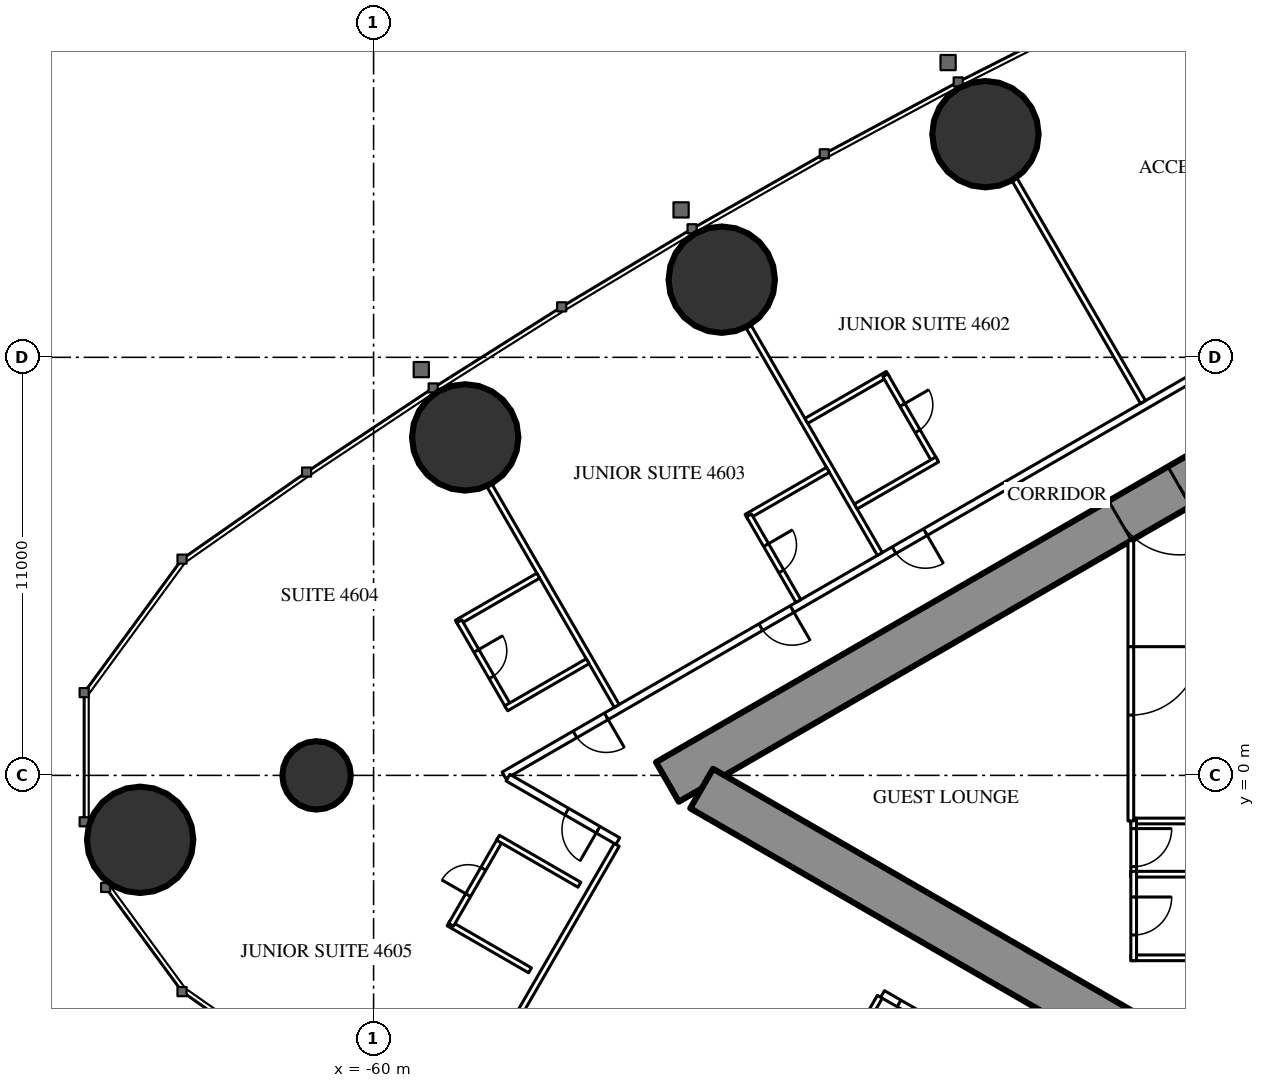
"""IFC4 building model, lengths in metres.
Left out: names, types, materials, properties, quantities, classifications, styles, units other than length and angle.
Written with IfcOpenShell. Run it as: python <this file> out.ifc"""

import sys

from ifc_helpers import new_model, si_unit, direction, frame, frame_2d, origin, origin_2d, place, context, subcontext, project, spatial, rectangle, circle, extrude, element, fill, save


model = new_model("IFC4")
c1 = context("Model", 3, precision=1e-05, world=origin(), true_north=direction((0.0, 1.0)))
c2 = subcontext(c1, "Body", "Model", "MODEL_VIEW")
j1 = project(units=[si_unit("LENGTHUNIT", "METRE"), si_unit("PLANEANGLEUNIT", "RADIAN")], contexts=[c1])
p1 = place(None, origin())
s1 = spatial("IfcSite", under=j1, at=p1, CompositionType="ELEMENT")
p2 = place(p1, origin())
s2 = spatial("IfcBuilding", under=s1, at=p2, CompositionType="ELEMENT")
p3 = place(p2, frame((0.0, 0.0, 173.8)))
s3 = spatial("IfcBuildingStorey", under=s2, at=p3, CompositionType="ELEMENT", Elevation=173.8)
for number, where, z_axis, x_axis in (
    (1, (-66.143, -1.695, 0.0), (0.0, 0.0, 1.0), (1.0, 0.0, 0.0)),
    (2, (-43.9, 16.871, 0.0), (0.0, 0.0, 1.0), (1.0, 0.0, 0.0)),
    (3, (-50.839, 13.043, 0.0), (0.0, 0.0, 1.0), (1.0, 0.0, 0.0)),
    (4, (-57.59, 8.893, 0.0), (0.0, 0.0, 1.0), (1.0, 0.0, 0.0)),
):
    element("IfcColumn", number, at=place(p3, frame(where, z_axis=z_axis, x_axis=x_axis)), inside=s3, PredefinedType="COLUMN", context=c2, shape_type="SweptSolid", body=[
        extrude(circle(Radius=1.4, at=origin_2d()), origin(), (0.0, 0.0, 1.0), 3.5),
    ])
p4 = place(p3, frame((-61.5, 0.0, 0.0), z_axis=(0.0, 0.0, 1.0), x_axis=(1.0, 0.0, 0.0)))
e5 = element("IfcColumn", 5, at=p4, inside=s3, PredefinedType="COLUMN", context=c2, shape_type="SweptSolid", body=[
    extrude(circle(Radius=0.9, at=origin_2d()), origin(), (0.0, 0.0, 1.0), 3.5),
])
p5 = place(p3, frame((-27.2, 14.3, 0.0), z_axis=(0.0, 0.0, 1.0), x_axis=(-0.866026593062, -0.499997940104, 0.0)))
e6 = element("IfcWall", 6, at=p5, inside=s3, PredefinedType="SHEAR", context=c2, shape_type="SweptSolid", body=[
    extrude(rectangle(XDim=28.946, YDim=1.2, at=frame_2d((14.473, 0.0))), origin(), (0.0, 0.0, 1.0), 3.5),
])
p6 = place(p5, frame((4.6, 0.0, 0.0)))
e7 = element("IfcOpeningElement", 7, at=p6, cuts=e6, PredefinedType="OPENING", context=c2, shape_type="SweptSolid", body=[
    extrude(rectangle(XDim=1.0, YDim=2.2, at=frame_2d((0.5, 1.1))), frame((0.0, 0.61, 0.0), z_axis=(0.0, -1.0, 0.0), x_axis=(1.0, 0.0, 0.0)), (0.0, 0.0, 1.0), 1.22),
])
p7 = place(p5, frame((13.395, 0.0, 0.0)))
e8 = element("IfcOpeningElement", 8, at=p7, cuts=e6, PredefinedType="OPENING", context=c2, shape_type="SweptSolid", body=[
    extrude(rectangle(XDim=1.8, YDim=2.2, at=frame_2d((0.9, 1.1))), frame((0.0, 0.61, 0.0), z_axis=(0.0, -1.0, 0.0), x_axis=(1.0, 0.0, 0.0)), (0.0, 0.0, 1.0), 1.22),
])
p8 = place(p3, frame((-27.2, -14.3, 0.0), z_axis=(0.0, 0.0, 1.0), x_axis=(-0.866024021859, 0.500002393557, 0.0)))
e9 = element("IfcWall", 9, at=p8, inside=s3, PredefinedType="SHEAR", context=c2, shape_type="SweptSolid", body=[
    extrude(rectangle(XDim=27.907, YDim=1.2, at=frame_2d((13.954, 0.0))), origin(), (0.0, 0.0, 1.0), 3.5),
])
p9 = place(p8, frame((4.6, 0.0, 0.0)))
e10 = element("IfcOpeningElement", 10, at=p9, cuts=e9, PredefinedType="OPENING", context=c2, shape_type="SweptSolid", body=[
    extrude(rectangle(XDim=1.0, YDim=2.2, at=frame_2d((0.5, 1.1))), frame((0.0, 0.61, 0.0), z_axis=(0.0, -1.0, 0.0), x_axis=(1.0, 0.0, 0.0)), (0.0, 0.0, 1.0), 1.22),
])
p10 = place(p8, frame((13.395, 0.0, 0.0)))
e11 = element("IfcOpeningElement", 11, at=p10, cuts=e9, PredefinedType="OPENING", context=c2, shape_type="SweptSolid", body=[
    extrude(rectangle(XDim=1.8, YDim=2.2, at=frame_2d((0.9, 1.1))), frame((0.0, 0.61, 0.0), z_axis=(0.0, -1.0, 0.0), x_axis=(1.0, 0.0, 0.0)), (0.0, 0.0, 1.0), 1.22),
])
p11 = place(p3, frame((-27.86, 16.575, 0.0), z_axis=(0.0, 0.0, 1.0), x_axis=(-0.866025533911, -0.499999774615, 0.0)))
e12 = element("IfcWall", 12, at=p11, inside=s3, PredefinedType="PARTITIONING", context=c2, shape_type="SweptSolid", body=[
    extrude(rectangle(XDim=33.149, YDim=0.2, at=frame_2d((16.575, 0.0))), origin(), (0.0, 0.0, 1.0), 3.25),
])
p12 = place(p11, frame((3.75, 0.0, 0.0)))
e13 = element("IfcOpeningElement", 13, at=p12, cuts=e12, PredefinedType="OPENING", context=c2, shape_type="SweptSolid", body=[
    extrude(rectangle(XDim=1.0, YDim=2.2, at=frame_2d((0.5, 1.1))), frame((0.0, 0.11, 0.0), z_axis=(0.0, -1.0, 0.0), x_axis=(1.0, 0.0, 0.0)), (0.0, 0.0, 1.0), 0.22),
])
p13 = place(p11, frame((20.347, 0.0, 0.0)))
e14 = element("IfcOpeningElement", 14, at=p13, cuts=e12, PredefinedType="OPENING", context=c2, shape_type="SweptSolid", body=[
    extrude(rectangle(XDim=0.95, YDim=2.2, at=frame_2d((0.475, 1.1))), frame((0.0, 0.11, 0.0), z_axis=(0.0, -1.0, 0.0), x_axis=(1.0, 0.0, 0.0)), (0.0, 0.0, 1.0), 0.22),
])
p14 = place(p11, frame((24.397, 0.0, 0.0)))
e15 = element("IfcOpeningElement", 15, at=p14, cuts=e12, PredefinedType="OPENING", context=c2, shape_type="SweptSolid", body=[
    extrude(rectangle(XDim=0.95, YDim=2.2, at=frame_2d((0.475, 1.1))), frame((0.0, 0.11, 0.0), z_axis=(0.0, -1.0, 0.0), x_axis=(1.0, 0.0, 0.0)), (0.0, 0.0, 1.0), 0.22),
])
p15 = place(p11, frame((30.042, 0.0, 0.0)))
e16 = element("IfcOpeningElement", 16, at=p15, cuts=e12, PredefinedType="OPENING", context=c2, shape_type="SweptSolid", body=[
    extrude(rectangle(XDim=0.95, YDim=2.2, at=frame_2d((0.475, 1.1))), frame((0.0, 0.11, 0.0), z_axis=(0.0, -1.0, 0.0), x_axis=(1.0, 0.0, 0.0)), (0.0, 0.0, 1.0), 0.22),
])
p16 = place(p3, frame((-39.754, 9.823, 0.0), z_axis=(0.0, 0.0, 1.0), x_axis=(-0.499997670926, 0.866026748472, 0.0)))
e17 = element("IfcWall", 17, at=p16, inside=s3, PredefinedType="PARTITIONING", context=c2, shape_type="SweptSolid", body=[
    extrude(rectangle(XDim=6.757, YDim=0.15, at=frame_2d((3.379, 0.0))), origin(), (0.0, 0.0, 1.0), 2.3),
])
p17 = place(p3, frame((-46.679, 5.825, 0.0), z_axis=(0.0, 0.0, 1.0), x_axis=(-0.500006839597, 0.866021454905, 0.0)))
e18 = element("IfcWall", 18, at=p17, inside=s3, PredefinedType="PARTITIONING", context=c2, shape_type="SweptSolid", body=[
    extrude(rectangle(XDim=6.911, YDim=0.15, at=frame_2d((3.456, 0.0))), origin(), (0.0, 0.0, 1.0), 2.3),
])
p18 = place(p3, frame((-53.602, 1.828, 0.0), z_axis=(0.0, 0.0, 1.0), x_axis=(-0.49999191814, 0.866030069798, 0.0)))
e19 = element("IfcWall", 19, at=p18, inside=s3, PredefinedType="PARTITIONING", context=c2, shape_type="SweptSolid", body=[
    extrude(rectangle(XDim=6.692, YDim=0.15, at=frame_2d((3.346, 0.0))), origin(), (0.0, 0.0, 1.0), 2.3),
])
p19 = place(p3, frame((-46.679, -5.825, 0.0), z_axis=(0.0, 0.0, 1.0), x_axis=(-0.500006839597, -0.866021454905, 0.0)))
e20 = element("IfcWall", 20, at=p19, inside=s3, PredefinedType="PARTITIONING", context=c2, shape_type="SweptSolid", body=[
    extrude(rectangle(XDim=6.911, YDim=0.15, at=frame_2d((3.456, 0.0))), origin(), (0.0, 0.0, 1.0), 2.3),
])
p20 = place(p3, frame((-53.602, -1.828, 0.0), z_axis=(0.0, 0.0, 1.0), x_axis=(-0.49999191814, -0.866030069798, 0.0)))
e21 = element("IfcWall", 21, at=p20, inside=s3, PredefinedType="PARTITIONING", context=c2, shape_type="SweptSolid", body=[
    extrude(rectangle(XDim=6.692, YDim=0.15, at=frame_2d((3.346, 0.0))), origin(), (0.0, 0.0, 1.0), 2.3),
])
p21 = place(p3, frame((-44.715, -6.844, 0.0), z_axis=(0.0, 0.0, 1.0), x_axis=(-0.865999496279, 0.500044870432, 0.0)))
e22 = element("IfcWall", 22, at=p21, inside=s3, PredefinedType="PARTITIONING", context=c2, shape_type="SweptSolid", body=[
    extrude(rectangle(XDim=2.185, YDim=0.2, at=frame_2d((1.092, 0.0))), origin(), (0.0, 0.0, 1.0), 3.25),
])
p22 = place(p21, frame((0.5, 0.0, 0.0)))
e23 = element("IfcOpeningElement", 23, at=p22, cuts=e22, PredefinedType="OPENING", context=c2, shape_type="SweptSolid", body=[
    extrude(rectangle(XDim=1.185, YDim=2.2, at=frame_2d((0.593, 1.1))), frame((0.0, 0.11, 0.0), z_axis=(0.0, -1.0, 0.0), x_axis=(1.0, 0.0, 0.0)), (0.0, 0.0, 1.0), 0.22),
])
p23 = place(p3, frame((-53.574, -1.729, 0.0), z_axis=(0.0, 0.0, 1.0), x_axis=(-0.866019930389, 0.500009480079, 0.0)))
e24 = element("IfcWall", 24, at=p23, inside=s3, PredefinedType="PARTITIONING", context=c2, shape_type="SweptSolid", body=[
    extrude(rectangle(XDim=3.338, YDim=0.2, at=frame_2d((1.669, 0.0))), origin(), (0.0, 0.0, 1.0), 3.25),
])
p24 = place(p23, frame((0.6, 0.0, 0.0)))
e25 = element("IfcOpeningElement", 25, at=p24, cuts=e24, PredefinedType="OPENING", context=c2, shape_type="SweptSolid", body=[
    extrude(rectangle(XDim=0.95, YDim=2.2, at=frame_2d((0.475, 1.1))), frame((0.0, 0.11, 0.0), z_axis=(0.0, -1.0, 0.0), x_axis=(1.0, 0.0, 0.0)), (0.0, 0.0, 1.0), 0.22),
])
p25 = place(p3, frame((-46.47, 10.564, 0.0), z_axis=(0.0, 0.0, 1.0), x_axis=(-0.866006523861, -0.500032699561, 0.0)))
e26 = element("IfcWall", 26, at=p25, inside=s3, PredefinedType="PARTITIONING", context=c2, shape_type="SweptSolid", body=[
    extrude(rectangle(XDim=2.475, YDim=0.15, at=frame_2d((1.237, 0.0))), origin(), (0.0, 0.0, 1.0), 3.25),
])
p26 = place(p3, frame((-45.235, 8.275, 0.0), z_axis=(0.0, 0.0, 1.0), x_axis=(-0.500006934395, 0.866021400173, 0.0)))
e27 = element("IfcWall", 27, at=p26, inside=s3, PredefinedType="PARTITIONING", context=c2, shape_type="SweptSolid", body=[
    extrude(rectangle(XDim=2.6, YDim=0.15, at=frame_2d((1.3, 0.0))), origin(), (0.0, 0.0, 1.0), 3.25),
])
p27 = place(p26, frame((0.9, 0.0, 0.0)))
e28 = element("IfcOpeningElement", 28, at=p27, cuts=e27, PredefinedType="OPENING", context=c2, shape_type="SweptSolid", body=[
    extrude(rectangle(XDim=0.8, YDim=2.2, at=frame_2d((0.4, 1.1))), frame((0.0, 0.085, 0.0), z_axis=(0.0, -1.0, 0.0), x_axis=(1.0, 0.0, 0.0)), (0.0, 0.0, 1.0), 0.17),
])
for number, where, z_axis, x_axis in (
    (29, (-45.17, 8.312, 0.0), (0.0, 0.0, 1.0), (-0.866, -0.5, 0.0)),
    (30, (-48.044, 8.039, 0.0), (0.0, 0.0, 1.0), (-0.866, -0.5, 0.0)),
):
    element("IfcWall", number, at=place(p3, frame(where, z_axis=z_axis, x_axis=x_axis)), inside=s3, PredefinedType="PARTITIONING", context=c2, shape_type="SweptSolid", body=[
        extrude(rectangle(XDim=2.475, YDim=0.15, at=frame_2d((1.238, 0.0))), origin(), (0.0, 0.0, 1.0), 3.25),
    ])
p28 = place(p3, frame((-48.822, 4.588, 0.0), z_axis=(0.0, 0.0, 1.0), x_axis=(-0.500006934395, 0.866021400173, 0.0)))
e31 = element("IfcWall", 31, at=p28, inside=s3, PredefinedType="PARTITIONING", context=c2, shape_type="SweptSolid", body=[
    extrude(rectangle(XDim=2.6, YDim=0.15, at=frame_2d((1.3, 0.0))), origin(), (0.0, 0.0, 1.0), 3.25),
])
p29 = place(p28, frame((0.9, 0.0, 0.0)))
e32 = element("IfcOpeningElement", 32, at=p29, cuts=e31, PredefinedType="OPENING", context=c2, shape_type="SweptSolid", body=[
    extrude(rectangle(XDim=0.8, YDim=2.2, at=frame_2d((0.4, 1.1))), frame((0.0, 0.085, 0.0), z_axis=(0.0, -1.0, 0.0), x_axis=(1.0, 0.0, 0.0)), (0.0, 0.0, 1.0), 0.17),
])
p30 = place(p3, frame((-55.667, 5.255, 0.0), z_axis=(0.0, 0.0, 1.0), x_axis=(-0.866006523861, -0.500032699561, 0.0)))
e33 = element("IfcWall", 33, at=p30, inside=s3, PredefinedType="PARTITIONING", context=c2, shape_type="SweptSolid", body=[
    extrude(rectangle(XDim=2.475, YDim=0.15, at=frame_2d((1.237, 0.0))), origin(), (0.0, 0.0, 1.0), 3.25),
])
p31 = place(p3, frame((-56.446, 1.803, 0.0), z_axis=(0.0, 0.0, 1.0), x_axis=(-0.499936506574, 0.866062058628, 0.0)))
e34 = element("IfcWall", 34, at=p31, inside=s3, PredefinedType="PARTITIONING", context=c2, shape_type="SweptSolid", body=[
    extrude(rectangle(XDim=2.6, YDim=0.15, at=frame_2d((1.3, 0.0))), origin(), (0.0, 0.0, 1.0), 3.25),
])
p32 = place(p31, frame((0.9, 0.0, 0.0)))
e35 = element("IfcOpeningElement", 35, at=p32, cuts=e34, PredefinedType="OPENING", context=c2, shape_type="SweptSolid", body=[
    extrude(rectangle(XDim=0.8, YDim=2.2, at=frame_2d((0.4, 1.1))), frame((0.0, 0.085, 0.0), z_axis=(0.0, -1.0, 0.0), x_axis=(1.0, 0.0, 0.0)), (0.0, 0.0, 1.0), 0.17),
])
p33 = place(p3, frame((-54.367, 3.003, 0.0), z_axis=(0.0, 0.0, 1.0), x_axis=(-0.866031185235, -0.4999899861, 0.0)))
e36 = element("IfcWall", 36, at=p33, inside=s3, PredefinedType="PARTITIONING", context=c2, shape_type="SweptSolid", body=[
    extrude(rectangle(XDim=2.475, YDim=0.15, at=frame_2d((1.238, 0.0))), origin(), (0.0, 0.0, 1.0), 3.25),
])
p34 = place(p3, frame((-55.884, -5.13, 0.0), z_axis=(0.0, 0.0, 1.0), x_axis=(-0.866006523861, 0.500032699561, 0.0)))
e37 = element("IfcWall", 37, at=p34, inside=s3, PredefinedType="PARTITIONING", context=c2, shape_type="SweptSolid", body=[
    extrude(rectangle(XDim=2.475, YDim=0.15, at=frame_2d((1.237, 0.0))), origin(), (0.0, 0.0, 1.0), 3.25),
])
p35 = place(p3, frame((-56.662, -1.678, 0.0), z_axis=(0.0, 0.0, 1.0), x_axis=(-0.500006934395, -0.866021400173, 0.0)))
e38 = element("IfcWall", 38, at=p35, inside=s3, PredefinedType="PARTITIONING", context=c2, shape_type="SweptSolid", body=[
    extrude(rectangle(XDim=2.6, YDim=0.15, at=frame_2d((1.3, 0.0))), origin(), (0.0, 0.0, 1.0), 3.25),
])
p36 = place(p35, frame((0.9, 0.0, 0.0)))
e39 = element("IfcOpeningElement", 39, at=p36, cuts=e38, PredefinedType="OPENING", context=c2, shape_type="SweptSolid", body=[
    extrude(rectangle(XDim=0.8, YDim=2.2, at=frame_2d((0.4, 1.1))), frame((0.0, 0.085, 0.0), z_axis=(0.0, -1.0, 0.0), x_axis=(1.0, 0.0, 0.0)), (0.0, 0.0, 1.0), 0.17),
])
p37 = place(p3, frame((-54.583, -2.878, 0.0), z_axis=(0.0, 0.0, 1.0), x_axis=(-0.866006523861, 0.500032699561, 0.0)))
e40 = element("IfcWall", 40, at=p37, inside=s3, PredefinedType="PARTITIONING", context=c2, shape_type="SweptSolid", body=[
    extrude(rectangle(XDim=2.475, YDim=0.15, at=frame_2d((1.237, 0.0))), origin(), (0.0, 0.0, 1.0), 3.25),
])
for number, where, z_axis, x_axis in (
    (41, (-37.9, -1.2, 0.0), (0.0, 0.0, 1.0), (-1.0, 0.0, 0.0)),
    (42, (-37.9, -2.6, 0.0), (0.0, 0.0, 1.0), (-1.0, 0.0, 0.0)),
    (43, (-37.9, -4.8, 0.0), (0.0, 0.0, 1.0), (-1.0, 0.0, 0.0)),
):
    element("IfcWall", number, at=place(p3, frame(where, z_axis=z_axis, x_axis=x_axis)), inside=s3, PredefinedType="PARTITIONING", context=c2, shape_type="SweptSolid", body=[
        extrude(rectangle(XDim=2.175, YDim=0.15, at=frame_2d((1.087, 0.0))), origin(), (0.0, 0.0, 1.0), 3.25),
    ])
p38 = place(p3, frame((-40.0, -1.125, 0.0), z_axis=(0.0, 0.0, 1.0), x_axis=(0.0, -1.0, 0.0)))
e44 = element("IfcWall", 44, at=p38, inside=s3, PredefinedType="PARTITIONING", context=c2, shape_type="SweptSolid", body=[
    extrude(rectangle(XDim=1.55, YDim=0.15, at=frame_2d((0.775, 0.0))), origin(), (0.0, 0.0, 1.0), 3.25),
])
p39 = place(p38, frame((0.275, 0.0, 0.0)))
e45 = element("IfcOpeningElement", 45, at=p39, cuts=e44, PredefinedType="OPENING", context=c2, shape_type="SweptSolid", body=[
    extrude(rectangle(XDim=1.0, YDim=2.2, at=frame_2d((0.5, 1.1))), frame((0.0, 0.085, 0.0), z_axis=(0.0, -1.0, 0.0), x_axis=(1.0, 0.0, 0.0)), (0.0, 0.0, 1.0), 0.17),
])
p40 = place(p3, frame((-40.0, -2.525, 0.0), z_axis=(0.0, 0.0, 1.0), x_axis=(0.0, -1.0, 0.0)))
e46 = element("IfcWall", 46, at=p40, inside=s3, PredefinedType="PARTITIONING", context=c2, shape_type="SweptSolid", body=[
    extrude(rectangle(XDim=2.35, YDim=0.15, at=frame_2d((1.175, 0.0))), origin(), (0.0, 0.0, 1.0), 3.25),
])
p41 = place(p40, frame((0.675, 0.0, 0.0)))
e47 = element("IfcOpeningElement", 47, at=p41, cuts=e46, PredefinedType="OPENING", context=c2, shape_type="SweptSolid", body=[
    extrude(rectangle(XDim=1.0, YDim=2.2, at=frame_2d((0.5, 1.1))), frame((0.0, 0.085, 0.0), z_axis=(0.0, -1.0, 0.0), x_axis=(1.0, 0.0, 0.0)), (0.0, 0.0, 1.0), 0.17),
])
p42 = place(p3, frame((-40.075, 6.174, 0.0), z_axis=(0.0, 0.0, 1.0), x_axis=(0.0, -1.0, 0.0)))
e48 = element("IfcWall", 48, at=p42, inside=s3, PredefinedType="PARTITIONING", context=c2, shape_type="SweptSolid", body=[
    extrude(rectangle(XDim=7.374, YDim=0.15, at=frame_2d((3.687, 0.0))), origin(), (0.0, 0.0, 1.0), 3.25),
])
p43 = place(p42, frame((2.787, 0.0, 0.0)))
e49 = element("IfcOpeningElement", 49, at=p43, cuts=e48, PredefinedType="OPENING", context=c2, shape_type="SweptSolid", body=[
    extrude(rectangle(XDim=1.8, YDim=2.2, at=frame_2d((0.9, 1.1))), frame((0.0, 0.085, 0.0), z_axis=(0.0, -1.0, 0.0), x_axis=(1.0, 0.0, 0.0)), (0.0, 0.0, 1.0), 0.17),
])
p44 = place(p27, origin())
e50 = element("IfcDoor", 50, at=p44, inside=s3, OperationType="SINGLE_SWING_RIGHT", PredefinedType="DOOR", context=c2, shape_type="SweptSolid", body=[
    extrude(rectangle(XDim=0.8, YDim=2.2, at=frame_2d((0.4, 1.1))), frame((0.0, 0.025, 0.0), z_axis=(0.0, -1.0, 0.0), x_axis=(1.0, 0.0, 0.0)), (0.0, 0.0, 1.0), 0.05),
])
fill(e28, e50)
p45 = place(p13, origin())
e51 = element("IfcDoor", 51, at=p45, inside=s3, OperationType="SINGLE_SWING_LEFT", PredefinedType="DOOR", context=c2, shape_type="SweptSolid", body=[
    extrude(rectangle(XDim=0.95, YDim=2.2, at=frame_2d((0.475, 1.1))), frame((0.0, 0.025, 0.0), z_axis=(0.0, -1.0, 0.0), x_axis=(1.0, 0.0, 0.0)), (0.0, 0.0, 1.0), 0.05),
])
fill(e14, e51)
p46 = place(p29, origin())
e52 = element("IfcDoor", 52, at=p46, inside=s3, OperationType="SINGLE_SWING_RIGHT", PredefinedType="DOOR", context=c2, shape_type="SweptSolid", body=[
    extrude(rectangle(XDim=0.8, YDim=2.2, at=frame_2d((0.4, 1.1))), frame((0.0, 0.025, 0.0), z_axis=(0.0, -1.0, 0.0), x_axis=(1.0, 0.0, 0.0)), (0.0, 0.0, 1.0), 0.05),
])
fill(e32, e52)
p47 = place(p14, origin())
e53 = element("IfcDoor", 53, at=p47, inside=s3, OperationType="SINGLE_SWING_LEFT", PredefinedType="DOOR", context=c2, shape_type="SweptSolid", body=[
    extrude(rectangle(XDim=0.95, YDim=2.2, at=frame_2d((0.475, 1.1))), frame((0.0, 0.025, 0.0), z_axis=(0.0, -1.0, 0.0), x_axis=(1.0, 0.0, 0.0)), (0.0, 0.0, 1.0), 0.05),
])
fill(e15, e53)
p48 = place(p32, origin())
e54 = element("IfcDoor", 54, at=p48, inside=s3, OperationType="SINGLE_SWING_RIGHT", PredefinedType="DOOR", context=c2, shape_type="SweptSolid", body=[
    extrude(rectangle(XDim=0.8, YDim=2.2, at=frame_2d((0.4, 1.1))), frame((0.0, 0.025, 0.0), z_axis=(0.0, -1.0, 0.0), x_axis=(1.0, 0.0, 0.0)), (0.0, 0.0, 1.0), 0.05),
])
fill(e35, e54)
p49 = place(p15, origin())
e55 = element("IfcDoor", 55, at=p49, inside=s3, OperationType="SINGLE_SWING_LEFT", PredefinedType="DOOR", context=c2, shape_type="SweptSolid", body=[
    extrude(rectangle(XDim=0.95, YDim=2.2, at=frame_2d((0.475, 1.1))), frame((0.0, 0.025, 0.0), z_axis=(0.0, -1.0, 0.0), x_axis=(1.0, 0.0, 0.0)), (0.0, 0.0, 1.0), 0.05),
])
fill(e16, e55)
p50 = place(p36, origin())
e56 = element("IfcDoor", 56, at=p50, inside=s3, OperationType="SINGLE_SWING_RIGHT", PredefinedType="DOOR", context=c2, shape_type="SweptSolid", body=[
    extrude(rectangle(XDim=0.8, YDim=2.2, at=frame_2d((0.4, 1.1))), frame((0.0, 0.025, 0.0), z_axis=(0.0, -1.0, 0.0), x_axis=(1.0, 0.0, 0.0)), (0.0, 0.0, 1.0), 0.05),
])
fill(e39, e56)
p51 = place(p24, origin())
e57 = element("IfcDoor", 57, at=p51, inside=s3, OperationType="SINGLE_SWING_LEFT", PredefinedType="DOOR", context=c2, shape_type="SweptSolid", body=[
    extrude(rectangle(XDim=0.95, YDim=2.2, at=frame_2d((0.475, 1.1))), frame((0.0, 0.025, 0.0), z_axis=(0.0, -1.0, 0.0), x_axis=(1.0, 0.0, 0.0)), (0.0, 0.0, 1.0), 0.05),
])
fill(e25, e57)
p52 = place(p22, origin())
e58 = element("IfcDoor", 58, at=p52, inside=s3, OperationType="SINGLE_SWING_LEFT", PredefinedType="DOOR", context=c2, shape_type="SweptSolid", body=[
    extrude(rectangle(XDim=1.185, YDim=2.2, at=frame_2d((0.593, 1.1))), frame((0.0, 0.025, 0.0), z_axis=(0.0, -1.0, 0.0), x_axis=(1.0, 0.0, 0.0)), (0.0, 0.0, 1.0), 0.05),
])
fill(e23, e58)
p53 = place(p39, origin())
e59 = element("IfcDoor", 59, at=p53, inside=s3, OperationType="SINGLE_SWING_LEFT", PredefinedType="DOOR", context=c2, shape_type="SweptSolid", body=[
    extrude(rectangle(XDim=1.0, YDim=2.2, at=frame_2d((0.5, 1.1))), frame((0.0, 0.025, 0.0), z_axis=(0.0, -1.0, 0.0), x_axis=(1.0, 0.0, 0.0)), (0.0, 0.0, 1.0), 0.05),
])
fill(e45, e59)
p54 = place(p41, origin())
e60 = element("IfcDoor", 60, at=p54, inside=s3, OperationType="SINGLE_SWING_LEFT", PredefinedType="DOOR", context=c2, shape_type="SweptSolid", body=[
    extrude(rectangle(XDim=1.0, YDim=2.2, at=frame_2d((0.5, 1.1))), frame((0.0, 0.025, 0.0), z_axis=(0.0, -1.0, 0.0), x_axis=(1.0, 0.0, 0.0)), (0.0, 0.0, 1.0), 0.05),
])
fill(e47, e60)
p55 = place(p43, origin())
e61 = element("IfcDoor", 61, at=p55, inside=s3, OperationType="DOUBLE_DOOR_SINGLE_SWING", PredefinedType="DOOR", context=c2, shape_type="SweptSolid", body=[
    extrude(rectangle(XDim=1.8, YDim=2.2, at=frame_2d((0.9, 1.1))), frame((0.0, 0.025, 0.0), z_axis=(0.0, -1.0, 0.0), x_axis=(1.0, 0.0, 0.0)), (0.0, 0.0, 1.0), 0.05),
])
fill(e49, e61)
p56 = place(p7, origin())
e62 = element("IfcDoor", 62, at=p56, inside=s3, OperationType="DOUBLE_DOOR_SINGLE_SWING", PredefinedType="DOOR", context=c2, shape_type="SweptSolid", body=[
    extrude(rectangle(XDim=1.8, YDim=2.2, at=frame_2d((0.9, 1.1))), frame((0.0, 0.025, 0.0), z_axis=(0.0, -1.0, 0.0), x_axis=(1.0, 0.0, 0.0)), (0.0, 0.0, 1.0), 0.05),
])
fill(e8, e62)
save(model, sys.argv[1])
